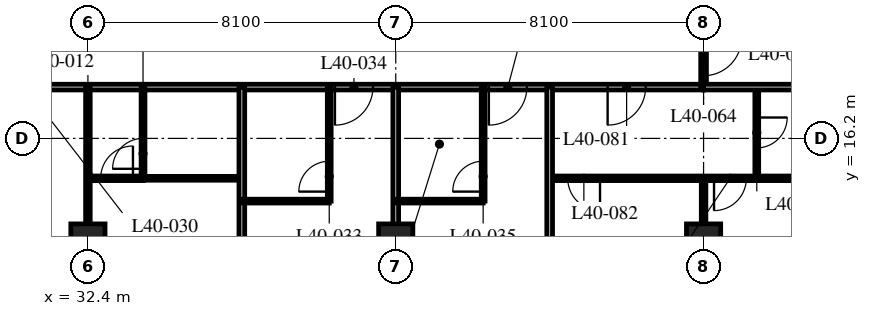
"""IFC4 building model, lengths in metres.
Left out: names, types, materials, properties, quantities, classifications, styles, units other than length and angle.
Written with IfcOpenShell. Run it as: python <this file> out.ifc"""

import sys

from ifc_helpers import new_model, si_unit, direction, frame, frame_2d, origin, origin_2d, place, context, subcontext, project, spatial, rectangle, hollow_rectangle, extrude, element, fill, save


model = new_model("IFC4")
c1 = context("Model", 3, precision=1e-05, world=origin(), true_north=direction((0.0, 1.0)))
c2 = subcontext(c1, "Body", "Model", "MODEL_VIEW")
j1 = project(units=[si_unit("LENGTHUNIT", "METRE"), si_unit("PLANEANGLEUNIT", "RADIAN")], contexts=[c1])
p1 = place(None, origin())
s1 = spatial("IfcSite", under=j1, at=p1, CompositionType="ELEMENT")
p2 = place(p1, origin())
s2 = spatial("IfcBuilding", under=s1, at=p2, CompositionType="ELEMENT")
p3 = place(p2, frame((0.0, 0.0, 154.4)))
s3 = spatial("IfcBuildingStorey", under=s2, at=p3, CompositionType="ELEMENT", Elevation=154.4)
for number, where, z_axis, x_axis in (
    (1, (32.4, 13.5, 0.0), (0.0, 0.0, 1.0), (1.0, 0.0, 0.0)),
    (2, (40.5, 13.5, 0.0), (0.0, 0.0, 1.0), (1.0, 0.0, 0.0)),
    (3, (48.6, 13.5, 0.0), (0.0, 0.0, 1.0), (1.0, 0.0, 0.0)),
):
    element("IfcColumn", number, at=place(p3, frame(where, z_axis=z_axis, x_axis=x_axis)), inside=s3, PredefinedType="COLUMN", context=c2, shape_type="SweptSolid", body=[
        extrude(hollow_rectangle(XDim=0.9, YDim=0.9, WallThickness=0.1, at=origin_2d()), origin(), (0.0, 0.0, 1.0), 3.4),
    ])
p4 = place(p3, frame((8.1, 17.55, 0.0), z_axis=(0.0, 0.0, 1.0), x_axis=(1.0, 0.0, 0.0)))
e4 = element("IfcWall", 4, at=p4, inside=s3, PredefinedType="PARTITIONING", context=c2, shape_type="SweptSolid", body=[
    extrude(rectangle(XDim=40.5, YDim=0.15, at=frame_2d((20.25, 0.0))), origin(), (0.0, 0.0, 1.0), 3.15),
])
p5 = place(p4, frame((10.0, 0.0, 0.0)))
e5 = element("IfcOpeningElement", 5, at=p5, cuts=e4, PredefinedType="OPENING", context=c2, shape_type="SweptSolid", body=[
    extrude(rectangle(XDim=1.0, YDim=2.1, at=frame_2d((0.5, 1.05))), frame((0.0, 0.085, 0.0), z_axis=(0.0, -1.0, 0.0), x_axis=(1.0, 0.0, 0.0)), (0.0, 0.0, 1.0), 0.17),
])
p6 = place(p4, frame((22.15, 0.0, 0.0)))
e6 = element("IfcOpeningElement", 6, at=p6, cuts=e4, PredefinedType="OPENING", context=c2, shape_type="SweptSolid", body=[
    extrude(rectangle(XDim=1.0, YDim=2.1, at=frame_2d((0.5, 1.05))), frame((0.0, 0.085, 0.0), z_axis=(0.0, -1.0, 0.0), x_axis=(1.0, 0.0, 0.0)), (0.0, 0.0, 1.0), 0.17),
])
p7 = place(p4, frame((30.8, 0.0, 0.0)))
e7 = element("IfcOpeningElement", 7, at=p7, cuts=e4, PredefinedType="OPENING", context=c2, shape_type="SweptSolid", body=[
    extrude(rectangle(XDim=1.0, YDim=2.1, at=frame_2d((0.5, 1.05))), frame((0.0, 0.085, 0.0), z_axis=(0.0, -1.0, 0.0), x_axis=(1.0, 0.0, 0.0)), (0.0, 0.0, 1.0), 0.17),
])
p8 = place(p4, frame((34.85, 0.0, 0.0)))
e8 = element("IfcOpeningElement", 8, at=p8, cuts=e4, PredefinedType="OPENING", context=c2, shape_type="SweptSolid", body=[
    extrude(rectangle(XDim=1.0, YDim=2.1, at=frame_2d((0.5, 1.05))), frame((0.0, 0.085, 0.0), z_axis=(0.0, -1.0, 0.0), x_axis=(1.0, 0.0, 0.0)), (0.0, 0.0, 1.0), 0.17),
])
p9 = place(p4, frame((1.525, 0.0, 0.0)))
e9 = element("IfcOpeningElement", 9, at=p9, cuts=e4, PredefinedType="OPENING", context=c2, shape_type="SweptSolid", body=[
    extrude(rectangle(XDim=1.0, YDim=2.1, at=frame_2d((0.5, 1.05))), frame((0.0, 0.085, 0.0), z_axis=(0.0, -1.0, 0.0), x_axis=(1.0, 0.0, 0.0)), (0.0, 0.0, 1.0), 0.17),
])
p10 = place(p4, frame((37.975, 0.0, 0.0)))
e10 = element("IfcOpeningElement", 10, at=p10, cuts=e4, PredefinedType="OPENING", context=c2, shape_type="SweptSolid", body=[
    extrude(rectangle(XDim=1.0, YDim=2.1, at=frame_2d((0.5, 1.05))), frame((0.0, 0.085, 0.0), z_axis=(0.0, -1.0, 0.0), x_axis=(1.0, 0.0, 0.0)), (0.0, 0.0, 1.0), 0.17),
])
p11 = place(p3, frame((48.6, 17.55, 0.0), z_axis=(0.0, 0.0, 1.0), x_axis=(0.0, 1.0, 0.0)))
e11 = element("IfcWall", 11, at=p11, inside=s3, PredefinedType="PARTITIONING", context=c2, shape_type="SweptSolid", body=[
    extrude(rectangle(XDim=28.35, YDim=0.15, at=frame_2d((14.175, 0.0))), origin(), (0.0, 0.0, 1.0), 2.15),
])
p12 = place(p11, frame((0.3, 0.0, 0.0)))
e12 = element("IfcOpeningElement", 12, at=p12, cuts=e11, PredefinedType="OPENING", context=c2, shape_type="SweptSolid", body=[
    extrude(rectangle(XDim=1.0, YDim=2.1, at=frame_2d((0.5, 1.05))), frame((0.0, 0.085, 0.0), z_axis=(0.0, -1.0, 0.0), x_axis=(1.0, 0.0, 0.0)), (0.0, 0.0, 1.0), 0.17),
])
p13 = place(p11, frame((6.5, 0.0, 0.0)))
e13 = element("IfcOpeningElement", 13, at=p13, cuts=e11, PredefinedType="OPENING", context=c2, shape_type="SweptSolid", body=[
    extrude(rectangle(XDim=1.0, YDim=2.1, at=frame_2d((0.5, 1.05))), frame((0.0, 0.085, 0.0), z_axis=(0.0, -1.0, 0.0), x_axis=(1.0, 0.0, 0.0)), (0.0, 0.0, 1.0), 0.17),
])
p14 = place(p11, frame((13.675, 0.0, 0.0)))
e14 = element("IfcOpeningElement", 14, at=p14, cuts=e11, PredefinedType="OPENING", context=c2, shape_type="SweptSolid", body=[
    extrude(rectangle(XDim=1.0, YDim=2.1, at=frame_2d((0.5, 1.05))), frame((0.0, 0.085, 0.0), z_axis=(0.0, -1.0, 0.0), x_axis=(1.0, 0.0, 0.0)), (0.0, 0.0, 1.0), 0.17),
])
p15 = place(p11, frame((22.7, 0.0, 0.0)))
e15 = element("IfcOpeningElement", 15, at=p15, cuts=e11, PredefinedType="OPENING", context=c2, shape_type="SweptSolid", body=[
    extrude(rectangle(XDim=1.0, YDim=2.1, at=frame_2d((0.5, 1.05))), frame((0.0, 0.085, 0.0), z_axis=(0.0, -1.0, 0.0), x_axis=(1.0, 0.0, 0.0)), (0.0, 0.0, 1.0), 0.17),
])
p16 = place(p11, frame((24.9, 0.0, 0.0)))
e16 = element("IfcOpeningElement", 16, at=p16, cuts=e11, PredefinedType="OPENING", context=c2, shape_type="SweptSolid", body=[
    extrude(rectangle(XDim=1.0, YDim=2.1, at=frame_2d((0.5, 1.05))), frame((0.0, 0.085, 0.0), z_axis=(0.0, -1.0, 0.0), x_axis=(1.0, 0.0, 0.0)), (0.0, 0.0, 1.0), 0.17),
])
p17 = place(p3, frame((33.85, 15.15, 0.0), z_axis=(0.0, 0.0, 1.0), x_axis=(1.0, 0.0, 0.0)))
e17 = element("IfcWall", 17, at=p17, inside=s3, PredefinedType="PARTITIONING", context=c2, shape_type="SweptSolid", body=[
    extrude(rectangle(XDim=2.6, YDim=0.1, at=frame_2d((1.3, 0.0))), origin(), (0.0, 0.0, 1.0), 3.15),
])
p18 = place(p3, frame((33.85, 17.55, 0.0), z_axis=(0.0, 0.0, 1.0), x_axis=(0.0, -1.0, 0.0)))
e18 = element("IfcWall", 18, at=p18, inside=s3, PredefinedType="PARTITIONING", context=c2, shape_type="SweptSolid", body=[
    extrude(rectangle(XDim=2.4, YDim=0.1, at=frame_2d((1.2, 0.0))), origin(), (0.0, 0.0, 1.0), 3.15),
])
p19 = place(p18, frame((1.35, 0.0, 0.0)))
e19 = element("IfcOpeningElement", 19, at=p19, cuts=e18, PredefinedType="OPENING", context=c2, shape_type="SweptSolid", body=[
    extrude(rectangle(XDim=0.8, YDim=2.1, at=frame_2d((0.4, 1.05))), frame((0.0, 0.06, 0.0), z_axis=(0.0, -1.0, 0.0), x_axis=(1.0, 0.0, 0.0)), (0.0, 0.0, 1.0), 0.12),
])
p20 = place(p3, frame((32.4, 17.55, 0.0), z_axis=(0.0, 0.0, 1.0), x_axis=(0.0, -1.0, 0.0)))
e20 = element("IfcWall", 20, at=p20, inside=s3, PredefinedType="PARTITIONING", context=c2, shape_type="SweptSolid", body=[
    extrude(rectangle(XDim=11.85, YDim=0.12, at=frame_2d((5.925, 0.0))), origin(), (0.0, 0.0, 1.0), 2.15),
])
p21 = place(p20, frame((6.85, 0.0, 0.0)))
e21 = element("IfcOpeningElement", 21, at=p21, cuts=e20, PredefinedType="OPENING", context=c2, shape_type="SweptSolid", body=[
    extrude(rectangle(XDim=0.85, YDim=2.1, at=frame_2d((0.425, 1.05))), frame((0.0, 0.07, 0.0), z_axis=(0.0, -1.0, 0.0), x_axis=(1.0, 0.0, 0.0)), (0.0, 0.0, 1.0), 0.14),
])
p22 = place(p3, frame((36.45, 17.55, 0.0), z_axis=(0.0, 0.0, 1.0), x_axis=(0.0, -1.0, 0.0)))
e22 = element("IfcWall", 22, at=p22, inside=s3, PredefinedType="PARTITIONING", context=c2, shape_type="SweptSolid", body=[
    extrude(rectangle(XDim=11.85, YDim=0.15, at=frame_2d((5.925, 0.0))), origin(), (0.0, 0.0, 1.0), 3.15),
])
p23 = place(p3, frame((36.45, 14.55, 0.0), z_axis=(0.0, 0.0, 1.0), x_axis=(1.0, 0.0, 0.0)))
e23 = element("IfcWall", 23, at=p23, inside=s3, PredefinedType="PARTITIONING", context=c2, shape_type="SweptSolid", body=[
    extrude(rectangle(XDim=2.3, YDim=0.1, at=frame_2d((1.15, 0.0))), origin(), (0.0, 0.0, 1.0), 3.15),
])
p24 = place(p3, frame((38.75, 17.55, 0.0), z_axis=(0.0, 0.0, 1.0), x_axis=(0.0, -1.0, 0.0)))
e24 = element("IfcWall", 24, at=p24, inside=s3, PredefinedType="PARTITIONING", context=c2, shape_type="SweptSolid", body=[
    extrude(rectangle(XDim=3.0, YDim=0.1, at=frame_2d((1.5, 0.0))), origin(), (0.0, 0.0, 1.0), 3.15),
])
p25 = place(p24, frame((1.95, 0.0, 0.0)))
e25 = element("IfcOpeningElement", 25, at=p25, cuts=e24, PredefinedType="OPENING", context=c2, shape_type="SweptSolid", body=[
    extrude(rectangle(XDim=0.8, YDim=2.1, at=frame_2d((0.4, 1.05))), frame((0.0, 0.06, 0.0), z_axis=(0.0, -1.0, 0.0), x_axis=(1.0, 0.0, 0.0)), (0.0, 0.0, 1.0), 0.12),
])
p26 = place(p3, frame((40.5, 17.55, 0.0), z_axis=(0.0, 0.0, 1.0), x_axis=(0.0, -1.0, 0.0)))
e26 = element("IfcWall", 26, at=p26, inside=s3, PredefinedType="PARTITIONING", context=c2, shape_type="SweptSolid", body=[
    extrude(rectangle(XDim=11.85, YDim=0.15, at=frame_2d((5.925, 0.0))), origin(), (0.0, 0.0, 1.0), 2.15),
])
p27 = place(p3, frame((40.5, 14.55, 0.0), z_axis=(0.0, 0.0, 1.0), x_axis=(1.0, 0.0, 0.0)))
e27 = element("IfcWall", 27, at=p27, inside=s3, PredefinedType="PARTITIONING", context=c2, shape_type="SweptSolid", body=[
    extrude(rectangle(XDim=2.3, YDim=0.1, at=frame_2d((1.15, 0.0))), origin(), (0.0, 0.0, 1.0), 3.15),
])
p28 = place(p3, frame((42.8, 17.55, 0.0), z_axis=(0.0, 0.0, 1.0), x_axis=(0.0, -1.0, 0.0)))
e28 = element("IfcWall", 28, at=p28, inside=s3, PredefinedType="PARTITIONING", context=c2, shape_type="SweptSolid", body=[
    extrude(rectangle(XDim=3.0, YDim=0.1, at=frame_2d((1.5, 0.0))), origin(), (0.0, 0.0, 1.0), 3.15),
])
p29 = place(p28, frame((1.95, 0.0, 0.0)))
e29 = element("IfcOpeningElement", 29, at=p29, cuts=e28, PredefinedType="OPENING", context=c2, shape_type="SweptSolid", body=[
    extrude(rectangle(XDim=0.8, YDim=2.1, at=frame_2d((0.4, 1.05))), frame((0.0, 0.06, 0.0), z_axis=(0.0, -1.0, 0.0), x_axis=(1.0, 0.0, 0.0)), (0.0, 0.0, 1.0), 0.12),
])
p30 = place(p3, frame((44.55, 15.15, 0.0), z_axis=(0.0, 0.0, 1.0), x_axis=(1.0, 0.0, 0.0)))
e30 = element("IfcWall", 30, at=p30, inside=s3, PredefinedType="PARTITIONING", context=c2, shape_type="SweptSolid", body=[
    extrude(rectangle(XDim=8.05, YDim=0.12, at=frame_2d((4.025, 0.0))), origin(), (0.0, 0.0, 1.0), 3.15),
])
p31 = place(p30, frame((0.475, 0.0, 0.0)))
e31 = element("IfcOpeningElement", 31, at=p31, cuts=e30, PredefinedType="OPENING", context=c2, shape_type="SweptSolid", body=[
    extrude(rectangle(XDim=0.85, YDim=2.1, at=frame_2d((0.425, 1.05))), frame((0.0, 0.07, 0.0), z_axis=(0.0, -1.0, 0.0), x_axis=(1.0, 0.0, 0.0)), (0.0, 0.0, 1.0), 0.14),
])
p32 = place(p30, frame((4.325, 0.0, 0.0)))
e32 = element("IfcOpeningElement", 32, at=p32, cuts=e30, PredefinedType="OPENING", context=c2, shape_type="SweptSolid", body=[
    extrude(rectangle(XDim=0.85, YDim=2.1, at=frame_2d((0.425, 1.05))), frame((0.0, 0.07, 0.0), z_axis=(0.0, -1.0, 0.0), x_axis=(1.0, 0.0, 0.0)), (0.0, 0.0, 1.0), 0.14),
])
p33 = place(p3, frame((50.0, 17.55, 0.0), z_axis=(0.0, 0.0, 1.0), x_axis=(0.0, -1.0, 0.0)))
e33 = element("IfcWall", 33, at=p33, inside=s3, PredefinedType="PARTITIONING", context=c2, shape_type="SweptSolid", body=[
    extrude(rectangle(XDim=2.4, YDim=0.1, at=frame_2d((1.2, 0.0))), origin(), (0.0, 0.0, 1.0), 3.15),
])
p34 = place(p33, frame((0.8, 0.0, 0.0)))
e34 = element("IfcOpeningElement", 34, at=p34, cuts=e33, PredefinedType="OPENING", context=c2, shape_type="SweptSolid", body=[
    extrude(rectangle(XDim=0.8, YDim=2.1, at=frame_2d((0.4, 1.05))), frame((0.0, 0.06, 0.0), z_axis=(0.0, -1.0, 0.0), x_axis=(1.0, 0.0, 0.0)), (0.0, 0.0, 1.0), 0.12),
])
p35 = place(p3, frame((48.6, 15.15, 0.0), z_axis=(0.0, 0.0, 1.0), x_axis=(0.0, -1.0, 0.0)))
e35 = element("IfcWall", 35, at=p35, inside=s3, PredefinedType="PARTITIONING", context=c2, shape_type="SweptSolid", body=[
    extrude(rectangle(XDim=5.4, YDim=0.12, at=frame_2d((2.7, 0.0))), origin(), (0.0, 0.0, 1.0), 2.15),
])
p36 = place(p3, frame((48.6, 17.55, 0.0), z_axis=(0.0, 0.0, 1.0), x_axis=(1.0, 0.0, 0.0)))
e36 = element("IfcWall", 36, at=p36, inside=s3, PredefinedType="PARTITIONING", context=c2, shape_type="SweptSolid", body=[
    extrude(rectangle(XDim=7.8, YDim=0.15, at=frame_2d((3.9, 0.0))), origin(), (0.0, 0.0, 1.0), 3.15),
])
p37 = place(p3, frame((44.55, 17.55, 0.0), z_axis=(0.0, 0.0, 1.0), x_axis=(0.0, -1.0, 0.0)))
e37 = element("IfcWall", 37, at=p37, inside=s3, PredefinedType="PARTITIONING", context=c2, shape_type="SweptSolid", body=[
    extrude(rectangle(XDim=11.85, YDim=0.15, at=frame_2d((5.925, 0.0))), origin(), (0.0, 0.0, 1.0), 3.15),
])
p38 = place(p3, frame((33.86, 15.15, 0.0), z_axis=(0.0, 0.0, 1.0), x_axis=(-1.0, 0.0, 0.0)))
e38 = element("IfcWall", 38, at=p38, inside=s3, PredefinedType="PARTITIONING", context=c2, shape_type="SweptSolid", body=[
    extrude(rectangle(XDim=1.46, YDim=0.12, at=frame_2d((0.73, 0.0))), origin(), (0.0, 0.0, 1.0), 3.15),
])
p39 = place(p38, frame((0.275, 0.0, 0.0)))
e39 = element("IfcOpeningElement", 39, at=p39, cuts=e38, PredefinedType="OPENING", context=c2, shape_type="SweptSolid", body=[
    extrude(rectangle(XDim=0.85, YDim=2.1, at=frame_2d((0.425, 1.05))), frame((0.0, 0.07, 0.0), z_axis=(0.0, -1.0, 0.0), x_axis=(1.0, 0.0, 0.0)), (0.0, 0.0, 1.0), 0.14),
])
p40 = place(p19, origin())
e40 = element("IfcDoor", 40, at=p40, inside=s3, OperationType="SINGLE_SWING_LEFT", PredefinedType="DOOR", context=c2, shape_type="SweptSolid", body=[
    extrude(rectangle(XDim=0.8, YDim=2.1, at=frame_2d((0.4, 1.05))), frame((0.0, 0.025, 0.0), z_axis=(0.0, -1.0, 0.0), x_axis=(1.0, 0.0, 0.0)), (0.0, 0.0, 1.0), 0.05),
])
fill(e19, e40)
p41 = place(p25, origin())
e41 = element("IfcDoor", 41, at=p41, inside=s3, OperationType="SINGLE_SWING_LEFT", PredefinedType="DOOR", context=c2, shape_type="SweptSolid", body=[
    extrude(rectangle(XDim=0.8, YDim=2.1, at=frame_2d((0.4, 1.05))), frame((0.0, 0.025, 0.0), z_axis=(0.0, -1.0, 0.0), x_axis=(1.0, 0.0, 0.0)), (0.0, 0.0, 1.0), 0.05),
])
fill(e25, e41)
p42 = place(p7, origin())
e42 = element("IfcDoor", 42, at=p42, inside=s3, OperationType="SINGLE_SWING_RIGHT", PredefinedType="DOOR", context=c2, shape_type="SweptSolid", body=[
    extrude(rectangle(XDim=1.0, YDim=2.1, at=frame_2d((0.5, 1.05))), frame((0.0, 0.025, 0.0), z_axis=(0.0, -1.0, 0.0), x_axis=(1.0, 0.0, 0.0)), (0.0, 0.0, 1.0), 0.05),
])
fill(e7, e42)
p43 = place(p29, origin())
e43 = element("IfcDoor", 43, at=p43, inside=s3, OperationType="SINGLE_SWING_LEFT", PredefinedType="DOOR", context=c2, shape_type="SweptSolid", body=[
    extrude(rectangle(XDim=0.8, YDim=2.1, at=frame_2d((0.4, 1.05))), frame((0.0, 0.025, 0.0), z_axis=(0.0, -1.0, 0.0), x_axis=(1.0, 0.0, 0.0)), (0.0, 0.0, 1.0), 0.05),
])
fill(e29, e43)
p44 = place(p8, origin())
e44 = element("IfcDoor", 44, at=p44, inside=s3, OperationType="SINGLE_SWING_RIGHT", PredefinedType="DOOR", context=c2, shape_type="SweptSolid", body=[
    extrude(rectangle(XDim=1.0, YDim=2.1, at=frame_2d((0.5, 1.05))), frame((0.0, 0.025, 0.0), z_axis=(0.0, -1.0, 0.0), x_axis=(1.0, 0.0, 0.0)), (0.0, 0.0, 1.0), 0.05),
])
fill(e8, e44)
p45 = place(p12, origin())
e45 = element("IfcDoor", 45, at=p45, inside=s3, OperationType="SINGLE_SWING_LEFT", PredefinedType="DOOR", context=c2, shape_type="SweptSolid", body=[
    extrude(rectangle(XDim=1.0, YDim=2.1, at=frame_2d((0.5, 1.05))), frame((0.0, 0.025, 0.0), z_axis=(0.0, -1.0, 0.0), x_axis=(1.0, 0.0, 0.0)), (0.0, 0.0, 1.0), 0.05),
])
fill(e12, e45)
p46 = place(p10, origin())
e46 = element("IfcDoor", 46, at=p46, inside=s3, OperationType="SINGLE_SWING_RIGHT", PredefinedType="DOOR", context=c2, shape_type="SweptSolid", body=[
    extrude(rectangle(XDim=1.0, YDim=2.1, at=frame_2d((0.5, 1.05))), frame((0.0, 0.025, 0.0), z_axis=(0.0, -1.0, 0.0), x_axis=(1.0, 0.0, 0.0)), (0.0, 0.0, 1.0), 0.05),
])
fill(e10, e46)
p47 = place(p31, origin())
e47 = element("IfcDoor", 47, at=p47, inside=s3, OperationType="SINGLE_SWING_LEFT", PredefinedType="DOOR", context=c2, shape_type="SweptSolid", body=[
    extrude(rectangle(XDim=0.85, YDim=2.1, at=frame_2d((0.425, 1.05))), frame((0.0, 0.025, 0.0), z_axis=(0.0, -1.0, 0.0), x_axis=(1.0, 0.0, 0.0)), (0.0, 0.0, 1.0), 0.05),
])
fill(e31, e47)
p48 = place(p34, origin())
e48 = element("IfcDoor", 48, at=p48, inside=s3, OperationType="SINGLE_SWING_LEFT", PredefinedType="DOOR", context=c2, shape_type="SweptSolid", body=[
    extrude(rectangle(XDim=0.8, YDim=2.1, at=frame_2d((0.4, 1.05))), frame((0.0, 0.025, 0.0), z_axis=(0.0, -1.0, 0.0), x_axis=(1.0, 0.0, 0.0)), (0.0, 0.0, 1.0), 0.05),
])
fill(e34, e48)
p49 = place(p32, origin())
e49 = element("IfcDoor", 49, at=p49, inside=s3, OperationType="SINGLE_SWING_RIGHT", PredefinedType="DOOR", context=c2, shape_type="SweptSolid", body=[
    extrude(rectangle(XDim=0.85, YDim=2.1, at=frame_2d((0.425, 1.05))), frame((0.0, 0.025, 0.0), z_axis=(0.0, -1.0, 0.0), x_axis=(1.0, 0.0, 0.0)), (0.0, 0.0, 1.0), 0.05),
])
fill(e32, e49)
p50 = place(p39, origin())
e50 = element("IfcDoor", 50, at=p50, inside=s3, OperationType="SINGLE_SWING_RIGHT", PredefinedType="DOOR", context=c2, shape_type="SweptSolid", body=[
    extrude(rectangle(XDim=0.85, YDim=2.1, at=frame_2d((0.425, 1.05))), frame((0.0, 0.025, 0.0), z_axis=(0.0, -1.0, 0.0), x_axis=(1.0, 0.0, 0.0)), (0.0, 0.0, 1.0), 0.05),
])
fill(e39, e50)
save(model, sys.argv[1])
